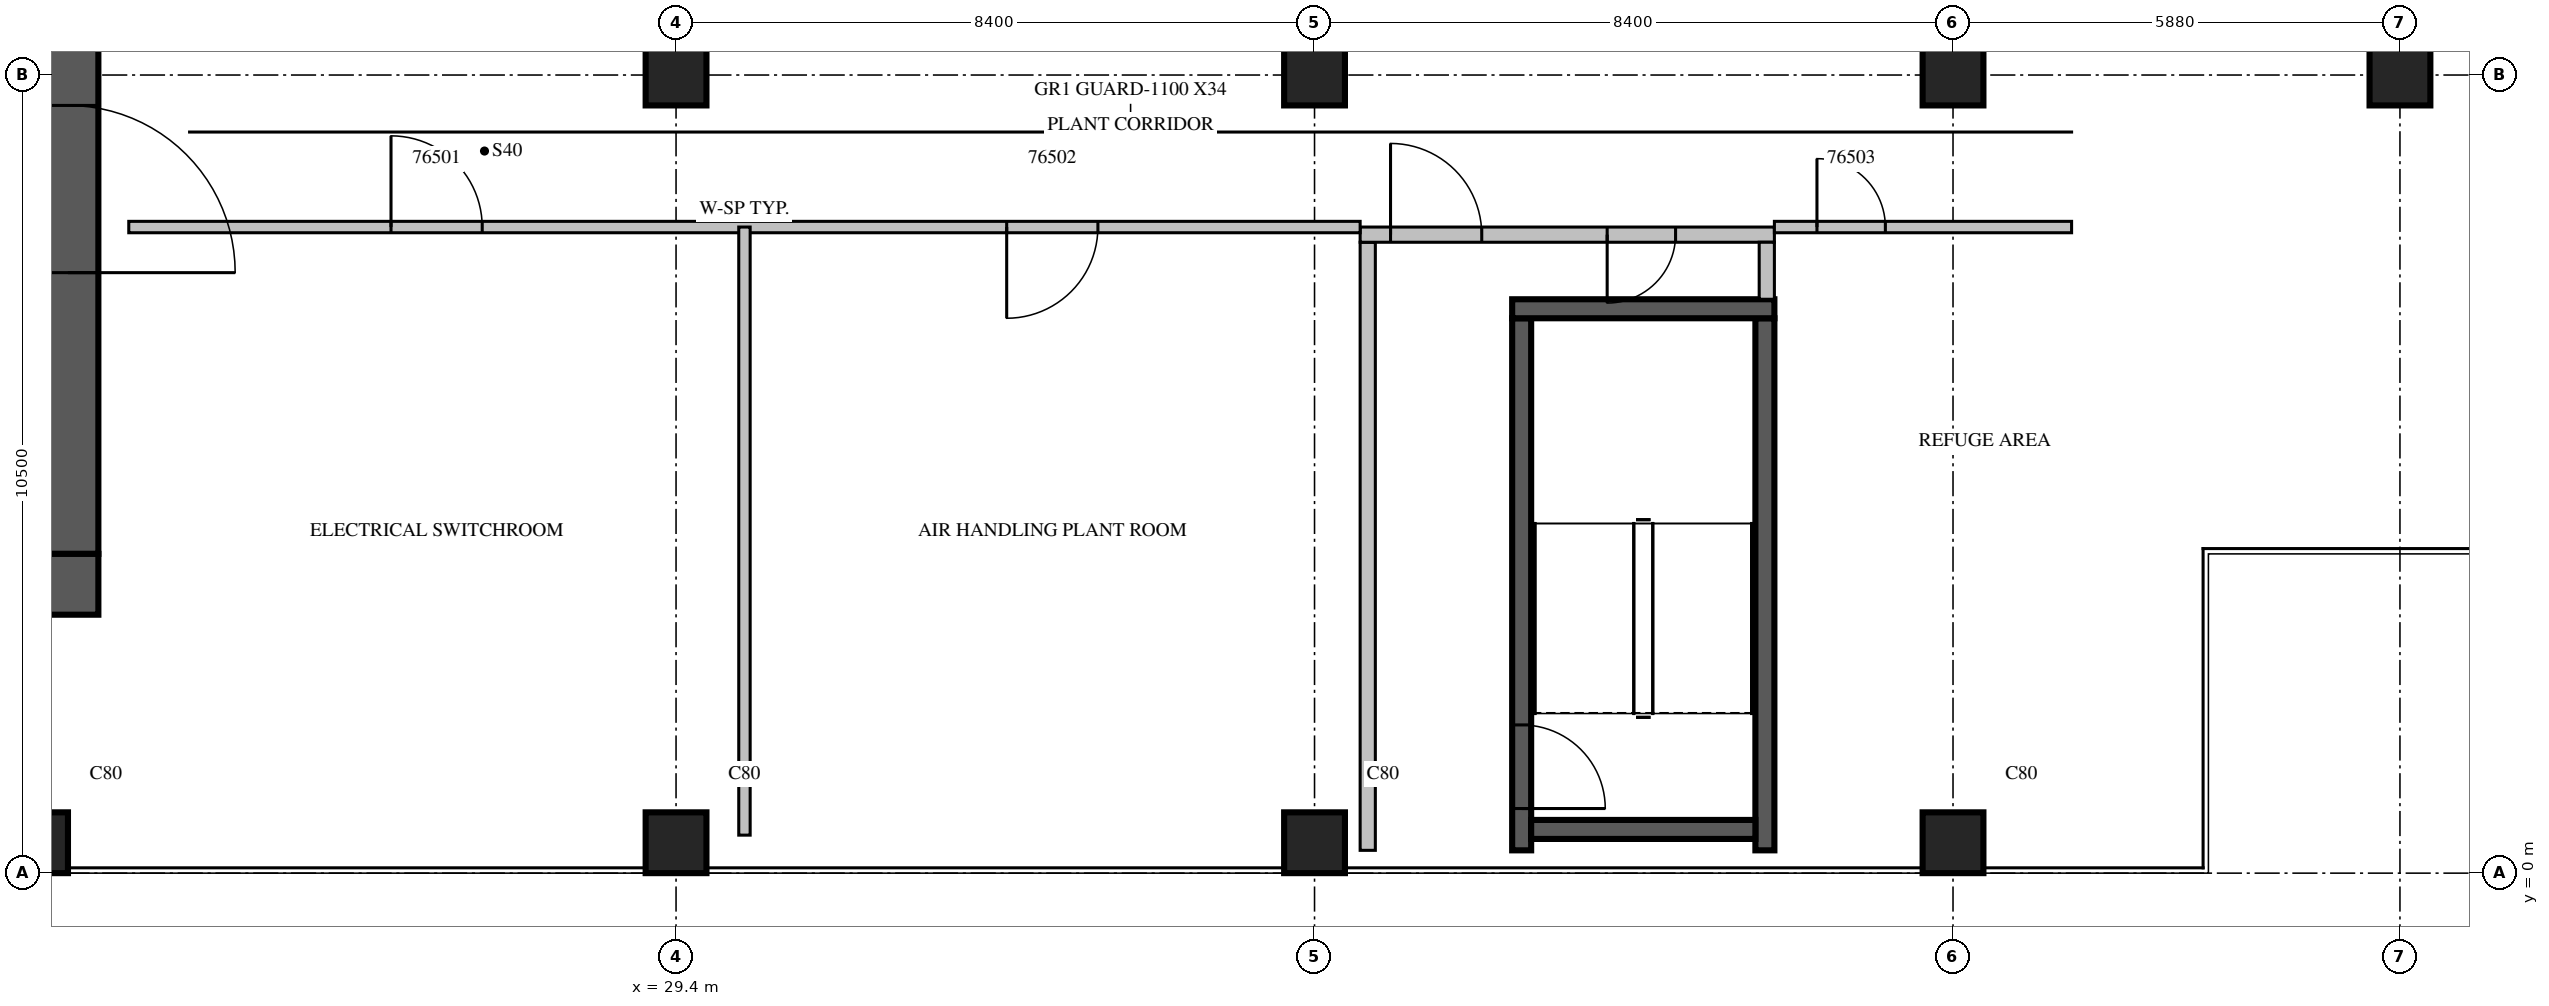
"""IFC4 building model, lengths in metres.
Left out: names, types, materials, properties, quantities, classifications, styles, units other than length and angle.
Written with IfcOpenShell. Run it as: python <this file> out.ifc"""

import sys

from ifc_helpers import new_model, si_unit, direction, frame, frame_2d, origin, origin_2d, place, context, subcontext, project, spatial, rectangle, extrude, source, transform, mapped, element, fill, save


model = new_model("IFC4")
c1 = context("Model", 3, precision=1e-05, world=origin(), true_north=direction((0.0, 1.0)))
c2 = subcontext(c1, "Body", "Model", "MODEL_VIEW")
j1 = project(units=[si_unit("LENGTHUNIT", "METRE"), si_unit("PLANEANGLEUNIT", "RADIAN")], contexts=[c1])
p1 = place(None, origin())
s1 = spatial("IfcSite", under=j1, at=p1, CompositionType="ELEMENT")
p2 = place(p1, origin())
s2 = spatial("IfcBuilding", under=s1, at=p2, CompositionType="ELEMENT")
p3 = place(p2, frame((0.0, 0.0, 269.0)))
s3 = spatial("IfcBuildingStorey", under=s2, at=p3, CompositionType="ELEMENT", Elevation=269.0)
m1 = source(origin(), c2, "Body", "SweptSolid", [
    extrude(rectangle(XDim=0.8, YDim=0.8, at=origin_2d()), origin(), (0.0, 0.0, 1.0), 8.0),
])
for number, where, z_axis, x_axis in (
    (1, (21.0, 0.4, 0.0), (0.0, 0.0, 1.0), (1.0, 0.0, 0.0)),
    (2, (29.4, 0.4, 0.0), (0.0, 0.0, 1.0), (1.0, 0.0, 0.0)),
    (3, (37.8, 0.4, 0.0), (0.0, 0.0, 1.0), (1.0, 0.0, 0.0)),
    (4, (46.2, 0.4, 0.0), (0.0, 0.0, 1.0), (1.0, 0.0, 0.0)),
    (5, (29.4, 10.5, 0.0), (0.0, 0.0, 1.0), (1.0, 0.0, 0.0)),
    (6, (37.8, 10.5, 0.0), (0.0, 0.0, 1.0), (1.0, 0.0, 0.0)),
    (7, (46.2, 10.5, 0.0), (0.0, 0.0, 1.0), (1.0, 0.0, 0.0)),
    (8, (52.08, 10.5, 0.0), (0.0, 0.0, 1.0), (1.0, 0.0, 0.0)),
):
    element("IfcColumn", number, at=place(p3, frame(where, z_axis=z_axis, x_axis=x_axis)), inside=s3, PredefinedType="COLUMN", context=c2, shape_type="MappedRepresentation", body=[
        mapped(m1, transform((0.0, 0.0, 0.0), scale=1.0)),
    ])
p4 = place(p3, frame((21.4, 4.2, 0.0), z_axis=(0.0, 0.0, 1.0), x_axis=(0.0, 1.0, 0.0)))
e9 = element("IfcWall", 9, at=p4, inside=s3, PredefinedType="SHEAR", context=c2, shape_type="SweptSolid", body=[
    extrude(rectangle(XDim=16.8, YDim=0.8, at=frame_2d((8.4, 0.0))), origin(), (0.0, 0.0, 1.0), 8.0),
])
m2 = source(origin(), c2, "Body", "SweptSolid", [
    extrude(rectangle(XDim=2.2, YDim=2.1, at=frame_2d((1.1, 1.05))), frame((0.0, 0.41, 0.0), z_axis=(0.0, -1.0, 0.0), x_axis=(1.0, 0.0, 0.0)), (0.0, 0.0, 1.0), 0.82),
])
p5 = place(p4, frame((3.7, 0.0, 0.0)))
e10 = element("IfcOpeningElement", 10, at=p5, cuts=e9, PredefinedType="OPENING", context=c2, shape_type="MappedRepresentation", body=[
    mapped(m2, transform((0.0, 0.0, 0.0), scale=1.0)),
])
m3 = source(origin(), c2, "Body", "SweptSolid", [
    extrude(rectangle(XDim=1.2, YDim=2.1, at=frame_2d((0.6, 1.05))), frame((0.0, 0.41, 0.0), z_axis=(0.0, -1.0, 0.0), x_axis=(1.0, 0.0, 0.0)), (0.0, 0.0, 1.0), 0.82),
])
p6 = place(p4, frame((14.7, 0.0, 0.0)))
e11 = element("IfcOpeningElement", 11, at=p6, cuts=e9, PredefinedType="OPENING", context=c2, shape_type="MappedRepresentation", body=[
    mapped(m3, transform((0.0, 0.0, 0.0), scale=1.0)),
])
m4 = source(origin(), c2, "Body", "SweptSolid", [
    extrude(rectangle(XDim=17.6, YDim=0.8, at=frame_2d((8.8, 0.0))), origin(), (0.0, 0.0, 1.0), 8.0),
])
p7 = place(p3, frame((4.2, 3.8, 0.0), z_axis=(0.0, 0.0, 1.0), x_axis=(1.0, 0.0, 0.0)))
e12 = element("IfcWall", 12, at=p7, inside=s3, PredefinedType="SHEAR", context=c2, shape_type="MappedRepresentation", body=[
    mapped(m4, transform((0.0, 0.0, 0.0), scale=1.0)),
])
m5 = source(origin(), c2, "Body", "SweptSolid", [
    extrude(rectangle(XDim=0.9, YDim=2.1, at=frame_2d((0.45, 1.05))), frame((0.0, 0.41, 0.0), z_axis=(0.0, -1.0, 0.0), x_axis=(1.0, 0.0, 0.0)), (0.0, 0.0, 1.0), 0.82),
])
p8 = place(p7, frame((12.75, 0.0, 0.0)))
e13 = element("IfcOpeningElement", 13, at=p8, cuts=e12, PredefinedType="OPENING", context=c2, shape_type="MappedRepresentation", body=[
    mapped(m5, transform((0.0, 0.0, 0.0), scale=1.0)),
])
m6 = source(origin(), c2, "Body", "SweptSolid", [
    extrude(rectangle(XDim=7.0, YDim=0.25, at=frame_2d((3.5, 0.0))), origin(), (0.0, 0.0, 1.0), 7.6),
])
p9 = place(p3, frame((40.525, 0.3, 0.0), z_axis=(0.0, 0.0, 1.0), x_axis=(0.0, 1.0, 0.0)))
e14 = element("IfcWall", 14, at=p9, inside=s3, PredefinedType="SOLIDWALL", context=c2, shape_type="MappedRepresentation", body=[
    mapped(m6, transform((0.0, 0.0, 0.0), scale=1.0)),
])
m7 = source(origin(), c2, "Body", "SweptSolid", [
    extrude(rectangle(XDim=1.1, YDim=2.1, at=frame_2d((0.55, 1.05))), frame((0.0, 0.135, 0.0), z_axis=(0.0, -1.0, 0.0), x_axis=(1.0, 0.0, 0.0)), (0.0, 0.0, 1.0), 0.27),
])
p10 = place(p9, frame((0.55, 0.0, 0.0)))
e15 = element("IfcOpeningElement", 15, at=p10, cuts=e14, PredefinedType="OPENING", context=c2, shape_type="MappedRepresentation", body=[
    mapped(m7, transform((0.0, 0.0, 0.0), scale=1.0)),
])
p11 = place(p3, frame((43.725, 0.3, 0.0), z_axis=(0.0, 0.0, 1.0), x_axis=(0.0, 1.0, 0.0)))
e16 = element("IfcWall", 16, at=p11, inside=s3, PredefinedType="SOLIDWALL", context=c2, shape_type="MappedRepresentation", body=[
    mapped(m6, transform((0.0, 0.0, 0.0), scale=1.0)),
])
m8 = source(origin(), c2, "Body", "SweptSolid", [
    extrude(rectangle(XDim=3.45, YDim=0.25, at=frame_2d((1.725, 0.0))), origin(), (0.0, 0.0, 1.0), 7.6),
])
p12 = place(p3, frame((40.4, 7.425, 0.0), z_axis=(0.0, 0.0, 1.0), x_axis=(1.0, 0.0, 0.0)))
e17 = element("IfcWall", 17, at=p12, inside=s3, PredefinedType="SOLIDWALL", context=c2, shape_type="MappedRepresentation", body=[
    mapped(m8, transform((0.0, 0.0, 0.0), scale=1.0)),
])
m9 = source(origin(), c2, "Body", "SweptSolid", [
    extrude(rectangle(XDim=2.95, YDim=0.25, at=frame_2d((1.475, 0.0))), origin(), (0.0, 0.0, 1.0), 7.6),
])
p13 = place(p3, frame((40.65, 0.575, 0.0), z_axis=(0.0, 0.0, 1.0), x_axis=(1.0, 0.0, 0.0)))
e18 = element("IfcWall", 18, at=p13, inside=s3, PredefinedType="SOLIDWALL", context=c2, shape_type="MappedRepresentation", body=[
    mapped(m9, transform((0.0, 0.0, 0.0), scale=1.0)),
])
m10 = source(origin(), c2, "Body", "SweptSolid", [
    extrude(rectangle(XDim=8.0, YDim=0.2, at=frame_2d((4.0, 0.0))), origin(), (0.0, 0.0, 1.0), 7.6),
])
p14 = place(p3, frame((38.5, 0.3, 0.0), z_axis=(0.0, 0.0, 1.0), x_axis=(0.0, 1.0, 0.0)))
e19 = element("IfcWall", 19, at=p14, inside=s3, PredefinedType="PARTITIONING", context=c2, shape_type="MappedRepresentation", body=[
    mapped(m10, transform((0.0, 0.0, 0.0), scale=1.0)),
])
m11 = source(origin(), c2, "Body", "SweptSolid", [
    extrude(rectangle(XDim=5.45, YDim=0.2, at=frame_2d((2.725, 0.0))), origin(), (0.0, 0.0, 1.0), 7.6),
])
p15 = place(p3, frame((38.4, 8.4, 0.0), z_axis=(0.0, 0.0, 1.0), x_axis=(1.0, 0.0, 0.0)))
e20 = element("IfcWall", 20, at=p15, inside=s3, PredefinedType="PARTITIONING", context=c2, shape_type="MappedRepresentation", body=[
    mapped(m11, transform((0.0, 0.0, 0.0), scale=1.0)),
])
m12 = source(origin(), c2, "Body", "SweptSolid", [
    extrude(rectangle(XDim=1.2, YDim=2.1, at=frame_2d((0.6, 1.05))), frame((0.0, 0.11, 0.0), z_axis=(0.0, -1.0, 0.0), x_axis=(1.0, 0.0, 0.0)), (0.0, 0.0, 1.0), 0.22),
])
p16 = place(p15, frame((0.4, 0.0, 0.0)))
e21 = element("IfcOpeningElement", 21, at=p16, cuts=e20, PredefinedType="OPENING", context=c2, shape_type="MappedRepresentation", body=[
    mapped(m12, transform((0.0, 0.0, 0.0), scale=1.0)),
])
m13 = source(origin(), c2, "Body", "SweptSolid", [
    extrude(rectangle(XDim=0.9, YDim=2.1, at=frame_2d((0.45, 1.05))), frame((0.0, 0.11, 0.0), z_axis=(0.0, -1.0, 0.0), x_axis=(1.0, 0.0, 0.0)), (0.0, 0.0, 1.0), 0.22),
])
p17 = place(p15, frame((3.25, 0.0, 0.0)))
e22 = element("IfcOpeningElement", 22, at=p17, cuts=e20, PredefinedType="OPENING", context=c2, shape_type="MappedRepresentation", body=[
    mapped(m13, transform((0.0, 0.0, 0.0), scale=1.0)),
])
m14 = source(origin(), c2, "Body", "SweptSolid", [
    extrude(rectangle(XDim=0.75, YDim=0.2, at=frame_2d((0.375, 0.0))), origin(), (0.0, 0.0, 1.0), 7.6),
])
p18 = place(p3, frame((43.75, 7.55, 0.0), z_axis=(0.0, 0.0, 1.0), x_axis=(0.0, 1.0, 0.0)))
e23 = element("IfcWall", 23, at=p18, inside=s3, PredefinedType="PARTITIONING", context=c2, shape_type="MappedRepresentation", body=[
    mapped(m14, transform((0.0, 0.0, 0.0), scale=1.0)),
])
m15 = source(origin(), c2, "Body", "SweptSolid", [
    extrude(rectangle(XDim=16.2, YDim=0.15, at=frame_2d((8.1, 0.0))), origin(), (0.0, 0.0, 1.0), 7.6),
])
p19 = place(p3, frame((22.2, 8.5, 0.0), z_axis=(0.0, 0.0, 1.0), x_axis=(1.0, 0.0, 0.0)))
e24 = element("IfcWall", 24, at=p19, inside=s3, PredefinedType="PARTITIONING", context=c2, shape_type="MappedRepresentation", body=[
    mapped(m15, transform((0.0, 0.0, 0.0), scale=1.0)),
])
m16 = source(origin(), c2, "Body", "SweptSolid", [
    extrude(rectangle(XDim=1.2, YDim=2.1, at=frame_2d((0.6, 1.05))), frame((0.0, 0.085, 0.0), z_axis=(0.0, -1.0, 0.0), x_axis=(1.0, 0.0, 0.0)), (0.0, 0.0, 1.0), 0.17),
])
p20 = place(p19, frame((3.45, 0.0, 0.0)))
e25 = element("IfcOpeningElement", 25, at=p20, cuts=e24, PredefinedType="OPENING", context=c2, shape_type="MappedRepresentation", body=[
    mapped(m16, transform((0.0, 0.0, 0.0), scale=1.0)),
])
p21 = place(p19, frame((11.55, 0.0, 0.0)))
e26 = element("IfcOpeningElement", 26, at=p21, cuts=e24, PredefinedType="OPENING", context=c2, shape_type="MappedRepresentation", body=[
    mapped(m16, transform((0.0, 0.0, 0.0), scale=1.0)),
])
m17 = source(origin(), c2, "Body", "SweptSolid", [
    extrude(rectangle(XDim=3.91, YDim=0.15, at=frame_2d((1.955, 0.0))), origin(), (0.0, 0.0, 1.0), 7.6),
])
p22 = place(p3, frame((43.85, 8.5, 0.0), z_axis=(0.0, 0.0, 1.0), x_axis=(1.0, 0.0, 0.0)))
e27 = element("IfcWall", 27, at=p22, inside=s3, PredefinedType="PARTITIONING", context=c2, shape_type="MappedRepresentation", body=[
    mapped(m17, transform((0.0, 0.0, 0.0), scale=1.0)),
])
m18 = source(origin(), c2, "Body", "SweptSolid", [
    extrude(rectangle(XDim=0.9, YDim=2.1, at=frame_2d((0.45, 1.05))), frame((0.0, 0.085, 0.0), z_axis=(0.0, -1.0, 0.0), x_axis=(1.0, 0.0, 0.0)), (0.0, 0.0, 1.0), 0.17),
])
p23 = place(p22, frame((0.56, 0.0, 0.0)))
e28 = element("IfcOpeningElement", 28, at=p23, cuts=e27, PredefinedType="OPENING", context=c2, shape_type="MappedRepresentation", body=[
    mapped(m18, transform((0.0, 0.0, 0.0), scale=1.0)),
])
m19 = source(origin(), c2, "Body", "SweptSolid", [
    extrude(rectangle(XDim=8.0, YDim=0.15, at=frame_2d((4.0, 0.0))), origin(), (0.0, 0.0, 1.0), 7.6),
])
p24 = place(p3, frame((30.3, 0.5, 0.0), z_axis=(0.0, 0.0, 1.0), x_axis=(0.0, 1.0, 0.0)))
e29 = element("IfcWall", 29, at=p24, inside=s3, PredefinedType="PARTITIONING", context=c2, shape_type="MappedRepresentation", body=[
    mapped(m19, transform((0.0, 0.0, 0.0), scale=1.0)),
])
m20 = source(origin(), c2, "Body", "SweptSolid", [
    extrude(rectangle(XDim=1.1, YDim=2.1, at=frame_2d((0.55, 1.05))), frame((0.0, 0.025, 0.0), z_axis=(0.0, -1.0, 0.0), x_axis=(1.0, 0.0, 0.0)), (0.0, 0.0, 1.0), 0.05),
])
p25 = place(p10, origin())
e30 = element("IfcDoor", 30, at=p25, inside=s3, OperationType="SINGLE_SWING_RIGHT", PredefinedType="DOOR", context=c2, shape_type="MappedRepresentation", body=[
    mapped(m20, transform((0.0, 0.0, 0.0), scale=1.0)),
])
fill(e15, e30)
m21 = source(origin(), c2, "Body", "SweptSolid", [
    extrude(rectangle(XDim=1.2, YDim=2.1, at=frame_2d((0.6, 1.05))), frame((0.0, 0.025, 0.0), z_axis=(0.0, -1.0, 0.0), x_axis=(1.0, 0.0, 0.0)), (0.0, 0.0, 1.0), 0.05),
])
p26 = place(p16, origin())
e31 = element("IfcDoor", 31, at=p26, inside=s3, OperationType="SINGLE_SWING_LEFT", PredefinedType="DOOR", context=c2, shape_type="MappedRepresentation", body=[
    mapped(m21, transform((0.0, 0.0, 0.0), scale=1.0)),
])
fill(e21, e31)
m22 = source(origin(), c2, "Body", "SweptSolid", [
    extrude(rectangle(XDim=0.9, YDim=2.1, at=frame_2d((0.45, 1.05))), frame((0.0, 0.025, 0.0), z_axis=(0.0, -1.0, 0.0), x_axis=(1.0, 0.0, 0.0)), (0.0, 0.0, 1.0), 0.05),
])
p27 = place(p17, origin())
e32 = element("IfcDoor", 32, at=p27, inside=s3, OperationType="SINGLE_SWING_RIGHT", PredefinedType="DOOR", context=c2, shape_type="MappedRepresentation", body=[
    mapped(m22, transform((0.0, 0.0, 0.0), scale=1.0)),
])
fill(e22, e32)
m23 = source(origin(), c2, "Body", "SweptSolid", [
    extrude(rectangle(XDim=2.2, YDim=2.1, at=frame_2d((1.1, 1.05))), frame((0.0, 0.025, 0.0), z_axis=(0.0, -1.0, 0.0), x_axis=(1.0, 0.0, 0.0)), (0.0, 0.0, 1.0), 0.05),
])
p28 = place(p5, origin())
e33 = element("IfcDoor", 33, at=p28, inside=s3, OperationType="DOUBLE_DOOR_SINGLE_SWING", PredefinedType="DOOR", context=c2, shape_type="MappedRepresentation", body=[
    mapped(m23, transform((0.0, 0.0, 0.0), scale=1.0)),
])
fill(e10, e33)
p29 = place(p20, origin())
e34 = element("IfcDoor", 34, at=p29, inside=s3, OperationType="SINGLE_SWING_LEFT", PredefinedType="DOOR", context=c2, shape_type="MappedRepresentation", body=[
    mapped(m21, transform((0.0, 0.0, 0.0), scale=1.0)),
])
fill(e25, e34)
p30 = place(p21, origin())
e35 = element("IfcDoor", 35, at=p30, inside=s3, OperationType="SINGLE_SWING_RIGHT", PredefinedType="DOOR", context=c2, shape_type="MappedRepresentation", body=[
    mapped(m21, transform((0.0, 0.0, 0.0), scale=1.0)),
])
fill(e26, e35)
p31 = place(p23, origin())
e36 = element("IfcDoor", 36, at=p31, inside=s3, OperationType="SINGLE_SWING_LEFT", PredefinedType="DOOR", context=c2, shape_type="MappedRepresentation", body=[
    mapped(m22, transform((0.0, 0.0, 0.0), scale=1.0)),
])
fill(e28, e36)
save(model, sys.argv[1])
